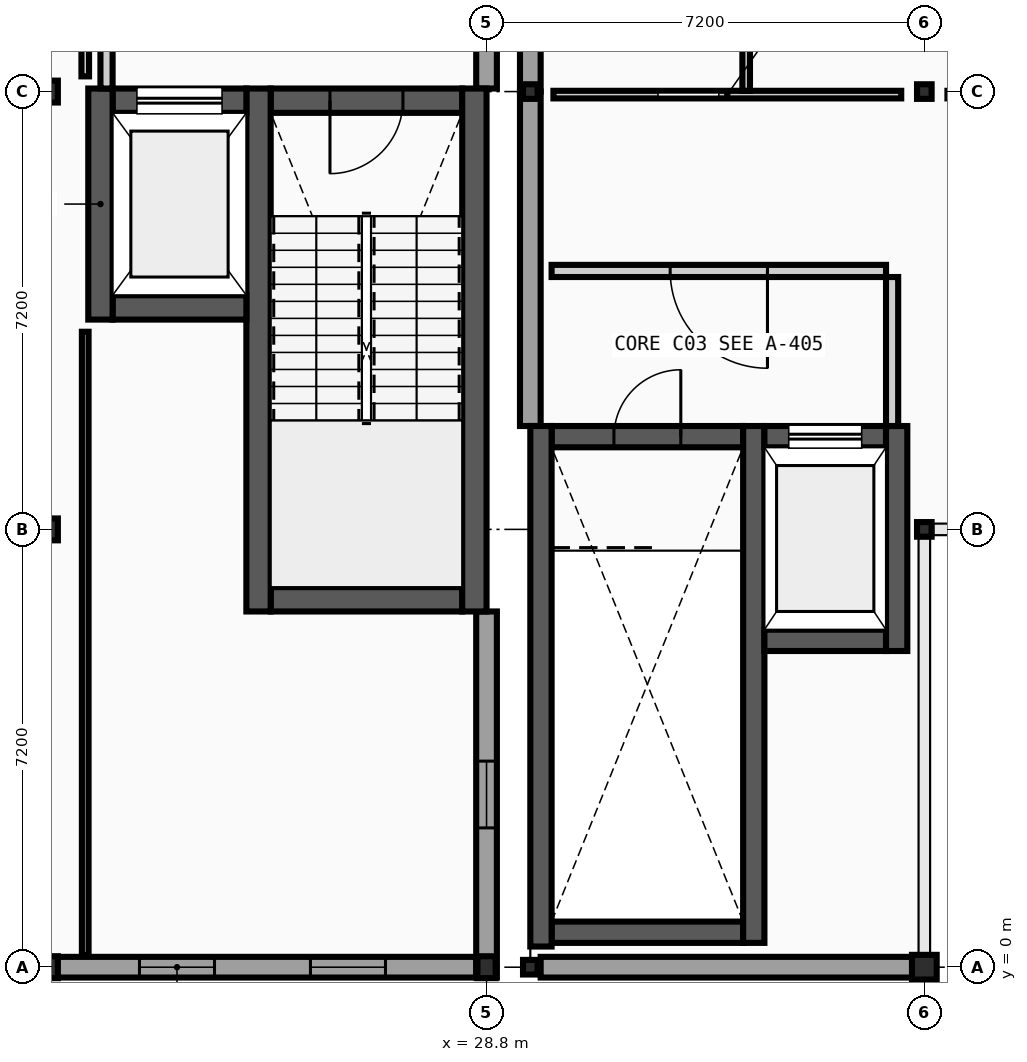
"""IFC4 building model, lengths in metres.
Left out: names, types, materials, properties, quantities, classifications, styles, units other than length and angle.
Written with IfcOpenShell. Run it as: python <this file> out.ifc"""

import sys

from ifc_helpers import new_model, si_unit, direction, frame, frame_2d, origin, origin_2d, place, context, subcontext, project, spatial, rectangle, hollow_circle, i_section, extrude, element, fill, save


model = new_model("IFC4")
c1 = context("Model", 3, precision=1e-05, world=origin(), true_north=direction((0.0, 1.0)))
c2 = subcontext(c1, "Body", "Model", "MODEL_VIEW")
j1 = project(units=[si_unit("LENGTHUNIT", "METRE"), si_unit("PLANEANGLEUNIT", "RADIAN")], contexts=[c1])
p1 = place(None, origin())
s1 = spatial("IfcSite", under=j1, at=p1, CompositionType="ELEMENT")
p2 = place(p1, origin())
s2 = spatial("IfcBuilding", under=s1, at=p2, CompositionType="ELEMENT")
p3 = place(p2, frame((0.0, 0.0, 18.4)))
s3 = spatial("IfcBuildingStorey", under=s2, at=p3, CompositionType="ELEMENT", Elevation=18.4)
for number, where, z_axis, x_axis in (
    (1, (21.6, 0.0, 0.0), (0.0, 0.0, 1.0), (1.0, 0.0, 0.0)),
    (2, (21.6, 7.2, 0.0), (0.0, 0.0, 1.0), (1.0, 0.0, 0.0)),
    (3, (21.6, 14.4, 0.0), (0.0, 0.0, 1.0), (1.0, 0.0, 0.0)),
    (4, (28.8, 0.0, 0.0), (0.0, 0.0, 1.0), (1.0, 0.0, 0.0)),
):
    element("IfcColumn", number, at=place(p3, frame(where, z_axis=z_axis, x_axis=x_axis)), inside=s3, PredefinedType="COLUMN", context=c2, shape_type="SweptSolid", body=[
        extrude(i_section(OverallWidth=0.3, OverallDepth=0.36, WebThickness=0.012, FlangeThickness=0.022, FilletRadius=0.027, at=origin_2d()), origin(), (0.0, 0.0, 1.0), 4.4),
    ])
for number, where, z_axis, x_axis in (
    (5, (29.52, 0.0, 0.0), (0.0, 0.0, 1.0), (1.0, 0.0, 0.0)),
    (6, (29.52, 14.4, 0.0), (0.0, 0.0, 1.0), (1.0, 0.0, 0.0)),
):
    element("IfcColumn", number, at=place(p3, frame(where, z_axis=z_axis, x_axis=x_axis)), inside=s3, PredefinedType="COLUMN", context=c2, shape_type="SweptSolid", body=[
        extrude(i_section(OverallWidth=0.24, OverallDepth=0.24, WebThickness=0.01, FlangeThickness=0.017, FilletRadius=0.021, at=origin_2d()), origin(), (0.0, 0.0, 1.0), 4.4),
    ])
p4 = place(p3, frame((36.0, 0.0, 0.0), z_axis=(0.0, 0.0, 1.0), x_axis=(1.0, 0.0, 0.0)))
e7 = element("IfcColumn", 7, at=p4, inside=s3, PredefinedType="COLUMN", context=c2, shape_type="SweptSolid", body=[
    extrude(hollow_circle(Radius=0.203, WallThickness=0.016, at=origin_2d()), origin(), (0.0, 0.0, 1.0), 4.4),
])
for number, where, z_axis, x_axis in (
    (8, (36.0, 7.2, 0.0), (0.0, 0.0, 1.0), (1.0, 0.0, 0.0)),
    (9, (36.0, 14.4, 0.0), (0.0, 0.0, 1.0), (1.0, 0.0, 0.0)),
):
    element("IfcColumn", number, at=place(p3, frame(where, z_axis=z_axis, x_axis=x_axis)), inside=s3, PredefinedType="COLUMN", context=c2, shape_type="SweptSolid", body=[
        extrude(i_section(OverallWidth=0.24, OverallDepth=0.24, WebThickness=0.01, FlangeThickness=0.017, FilletRadius=0.021, at=origin_2d()), origin(), (0.0, 0.0, 1.0), 4.4),
    ])
p5 = place(p3, frame((21.6, 0.0, 0.0), z_axis=(0.0, 0.0, 1.0), x_axis=(1.0, 0.0, 0.0)))
e10 = element("IfcWall", 10, at=p5, inside=s3, PredefinedType="STANDARD", context=c2, shape_type="SweptSolid", body=[
    extrude(rectangle(XDim=7.03, YDim=0.34, at=frame_2d((3.515, 0.0))), origin(), (0.0, 0.0, 1.0), 3.95),
])
p6 = place(p5, frame((1.492, 0.0, 0.95)))
e11 = element("IfcOpeningElement", 11, at=p6, cuts=e10, PredefinedType="OPENING", context=c2, shape_type="SweptSolid", body=[
    extrude(rectangle(XDim=1.234, YDim=1.368, at=frame_2d((0.617, 0.684))), frame((0.0, 0.18, 0.0), z_axis=(0.0, -1.0, 0.0), x_axis=(1.0, 0.0, 0.0)), (0.0, 0.0, 1.0), 0.36),
])
p7 = place(p5, frame((4.304, 0.0, 0.95)))
e12 = element("IfcOpeningElement", 12, at=p7, cuts=e10, PredefinedType="OPENING", context=c2, shape_type="SweptSolid", body=[
    extrude(rectangle(XDim=1.234, YDim=1.368, at=frame_2d((0.617, 0.684))), frame((0.0, 0.18, 0.0), z_axis=(0.0, -1.0, 0.0), x_axis=(1.0, 0.0, 0.0)), (0.0, 0.0, 1.0), 0.36),
])
p8 = place(p3, frame((28.8, -0.17, 0.0), z_axis=(0.0, 0.0, 1.0), x_axis=(0.0, 1.0, 0.0)))
e13 = element("IfcWall", 13, at=p8, inside=s3, PredefinedType="STANDARD", context=c2, shape_type="SweptSolid", body=[
    extrude(rectangle(XDim=6.02, YDim=0.34, at=frame_2d((3.01, 0.0))), origin(), (0.0, 0.0, 1.0), 4.215),
])
p9 = place(p8, frame((2.461, 0.0, 0.95)))
e14 = element("IfcOpeningElement", 14, at=p9, cuts=e13, PredefinedType="OPENING", context=c2, shape_type="SweptSolid", body=[
    extrude(rectangle(XDim=1.098, YDim=1.404, at=frame_2d((0.549, 0.702))), frame((0.0, 0.18, 0.0), z_axis=(0.0, -1.0, 0.0), x_axis=(1.0, 0.0, 0.0)), (0.0, 0.0, 1.0), 0.36),
])
p10 = place(p3, frame((28.8, 14.45, 0.0), z_axis=(0.0, 0.0, 1.0), x_axis=(0.0, 1.0, 0.0)))
e15 = element("IfcWall", 15, at=p10, inside=s3, PredefinedType="STANDARD", context=c2, shape_type="SweptSolid", body=[
    extrude(rectangle(XDim=7.15, YDim=0.34, at=frame_2d((3.575, 0.0))), origin(), (0.0, 0.0, 1.0), 4.215),
])
p11 = place(p10, frame((1.579, 0.0, 0.95)))
e16 = element("IfcOpeningElement", 16, at=p11, cuts=e15, PredefinedType="OPENING", context=c2, shape_type="SweptSolid", body=[
    extrude(rectangle(XDim=1.132, YDim=1.404, at=frame_2d((0.566, 0.702))), frame((0.0, 0.18, 0.0), z_axis=(0.0, -1.0, 0.0), x_axis=(1.0, 0.0, 0.0)), (0.0, 0.0, 1.0), 0.36),
])
p12 = place(p10, frame((4.439, 0.0, 0.95)))
e17 = element("IfcOpeningElement", 17, at=p12, cuts=e15, PredefinedType="OPENING", context=c2, shape_type="SweptSolid", body=[
    extrude(rectangle(XDim=1.132, YDim=1.404, at=frame_2d((0.566, 0.702))), frame((0.0, 0.18, 0.0), z_axis=(0.0, -1.0, 0.0), x_axis=(1.0, 0.0, 0.0)), (0.0, 0.0, 1.0), 0.36),
])
p13 = place(p3, frame((29.69, 0.0, 0.0), z_axis=(0.0, 0.0, 1.0), x_axis=(1.0, 0.0, 0.0)))
e18 = element("IfcWall", 18, at=p13, inside=s3, PredefinedType="STANDARD", context=c2, shape_type="SweptSolid", body=[
    extrude(rectangle(XDim=6.42, YDim=0.34, at=frame_2d((3.21, 0.0))), origin(), (0.0, 0.0, 1.0), 4.035),
])
p14 = place(p3, frame((29.52, 14.4, 0.0), z_axis=(0.0, 0.0, 1.0), x_axis=(0.0, -1.0, 0.0)))
e19 = element("IfcWall", 19, at=p14, inside=s3, PredefinedType="STANDARD", context=c2, shape_type="SweptSolid", body=[
    extrude(rectangle(XDim=5.5, YDim=0.34, at=frame_2d((2.75, 0.0))), origin(), (0.0, 0.0, 1.0), 4.11),
])
p15 = place(p3, frame((29.52, 21.77, 0.0), z_axis=(0.0, 0.0, 1.0), x_axis=(0.0, -1.0, 0.0)))
e20 = element("IfcWall", 20, at=p15, inside=s3, PredefinedType="STANDARD", context=c2, shape_type="SweptSolid", body=[
    extrude(rectangle(XDim=7.37, YDim=0.34, at=frame_2d((3.685, 0.0))), origin(), (0.0, 0.0, 1.0), 4.11),
])
p16 = place(p15, frame((1.577, 0.0, 0.95)))
e21 = element("IfcOpeningElement", 21, at=p16, cuts=e20, PredefinedType="OPENING", context=c2, shape_type="SweptSolid", body=[
    extrude(rectangle(XDim=1.268, YDim=1.404, at=frame_2d((0.634, 0.702))), frame((0.0, 0.18, 0.0), z_axis=(0.0, -1.0, 0.0), x_axis=(1.0, 0.0, 0.0)), (0.0, 0.0, 1.0), 0.36),
])
p17 = place(p15, frame((4.525, 0.0, 0.95)))
e22 = element("IfcOpeningElement", 22, at=p17, cuts=e20, PredefinedType="OPENING", context=c2, shape_type="SweptSolid", body=[
    extrude(rectangle(XDim=1.268, YDim=1.404, at=frame_2d((0.634, 0.702))), frame((0.0, 0.18, 0.0), z_axis=(0.0, -1.0, 0.0), x_axis=(1.0, 0.0, 0.0)), (0.0, 0.0, 1.0), 0.36),
])
p18 = place(p3, frame((25.25, 6.05, 0.0), z_axis=(0.0, 0.0, 1.0), x_axis=(1.0, 0.0, 0.0)))
e23 = element("IfcWall", 23, at=p18, inside=s3, PredefinedType="SHEAR", context=c2, shape_type="SweptSolid", body=[
    extrude(rectangle(XDim=3.15, YDim=0.4, at=frame_2d((1.575, 0.0))), origin(), (0.0, 0.0, 1.0), 4.215),
])
p19 = place(p3, frame((25.25, 14.25, 0.0), z_axis=(0.0, 0.0, 1.0), x_axis=(1.0, 0.0, 0.0)))
e24 = element("IfcWall", 24, at=p19, inside=s3, PredefinedType="SHEAR", context=c2, shape_type="SweptSolid", body=[
    extrude(rectangle(XDim=3.15, YDim=0.4, at=frame_2d((1.575, 0.0))), origin(), (0.0, 0.0, 1.0), 4.215),
])
p20 = place(p19, frame((0.975, 0.0, 0.0)))
e25 = element("IfcOpeningElement", 25, at=p20, cuts=e24, PredefinedType="OPENING", context=c2, shape_type="SweptSolid", body=[
    extrude(rectangle(XDim=1.2, YDim=2.15, at=frame_2d((0.6, 1.075))), frame((0.0, 0.21, 0.0), z_axis=(0.0, -1.0, 0.0), x_axis=(1.0, 0.0, 0.0)), (0.0, 0.0, 1.0), 0.42),
])
for number, where, z_axis, x_axis in (
    (26, (25.05, 5.85, 0.0), (0.0, 0.0, 1.0), (0.0, 1.0, 0.0)),
    (27, (28.6, 5.85, 0.0), (0.0, 0.0, 1.0), (0.0, 1.0, 0.0)),
):
    element("IfcWall", number, at=place(p3, frame(where, z_axis=z_axis, x_axis=x_axis)), inside=s3, PredefinedType="SHEAR", context=c2, shape_type="SweptSolid", body=[
        extrude(rectangle(XDim=8.6, YDim=0.4, at=frame_2d((4.3, 0.0))), origin(), (0.0, 0.0, 1.0), 4.215),
    ])
p21 = place(p3, frame((22.65, 10.85, 0.0), z_axis=(0.0, 0.0, 1.0), x_axis=(1.0, 0.0, 0.0)))
e28 = element("IfcWall", 28, at=p21, inside=s3, PredefinedType="SHEAR", context=c2, shape_type="SweptSolid", body=[
    extrude(rectangle(XDim=2.2, YDim=0.4, at=frame_2d((1.1, 0.0))), origin(), (0.0, 0.0, 1.0), 4.215),
])
p22 = place(p3, frame((22.65, 14.25, 0.0), z_axis=(0.0, 0.0, 1.0), x_axis=(1.0, 0.0, 0.0)))
e29 = element("IfcWall", 29, at=p22, inside=s3, PredefinedType="SHEAR", context=c2, shape_type="SweptSolid", body=[
    extrude(rectangle(XDim=2.2, YDim=0.4, at=frame_2d((1.1, 0.0))), origin(), (0.0, 0.0, 1.0), 4.215),
])
p23 = place(p22, frame((0.4, 0.0, 0.0)))
e30 = element("IfcOpeningElement", 30, at=p23, cuts=e29, PredefinedType="OPENING", context=c2, shape_type="SweptSolid", body=[
    extrude(rectangle(XDim=1.4, YDim=2.2, at=frame_2d((0.7, 1.1))), frame((0.0, 0.21, 0.0), z_axis=(0.0, -1.0, 0.0), x_axis=(1.0, 0.0, 0.0)), (0.0, 0.0, 1.0), 0.42),
])
p24 = place(p3, frame((22.45, 10.65, 0.0), z_axis=(0.0, 0.0, 1.0), x_axis=(0.0, 1.0, 0.0)))
e31 = element("IfcWall", 31, at=p24, inside=s3, PredefinedType="SHEAR", context=c2, shape_type="SweptSolid", body=[
    extrude(rectangle(XDim=3.8, YDim=0.4, at=frame_2d((1.9, 0.0))), origin(), (0.0, 0.0, 1.0), 4.215),
])
p25 = place(p3, frame((22.55, 14.45, 0.0), z_axis=(0.0, 0.0, 1.0), x_axis=(0.0, 1.0, 0.0)))
e32 = element("IfcWall", 32, at=p25, inside=s3, PredefinedType="PARTITIONING", context=c2, shape_type="SweptSolid", body=[
    extrude(rectangle(XDim=3.2, YDim=0.2, at=frame_2d((1.6, 0.0))), origin(), (0.0, 0.0, 1.0), 4.215),
])
p26 = place(p3, frame((29.87, 0.575, 0.0), z_axis=(0.0, 0.0, 1.0), x_axis=(1.0, 0.0, 0.0)))
e33 = element("IfcWall", 33, at=p26, inside=s3, PredefinedType="SHEAR", context=c2, shape_type="SweptSolid", body=[
    extrude(rectangle(XDim=3.15, YDim=0.35, at=frame_2d((1.575, 0.0))), origin(), (0.0, 0.0, 1.0), 4.18),
])
p27 = place(p3, frame((29.87, 8.725, 0.0), z_axis=(0.0, 0.0, 1.0), x_axis=(1.0, 0.0, 0.0)))
e34 = element("IfcWall", 34, at=p27, inside=s3, PredefinedType="SHEAR", context=c2, shape_type="SweptSolid", body=[
    extrude(rectangle(XDim=3.15, YDim=0.35, at=frame_2d((1.575, 0.0))), origin(), (0.0, 0.0, 1.0), 4.18),
])
p28 = place(p27, frame((1.025, 0.0, 0.0)))
e35 = element("IfcOpeningElement", 35, at=p28, cuts=e34, PredefinedType="OPENING", context=c2, shape_type="SweptSolid", body=[
    extrude(rectangle(XDim=1.1, YDim=2.15, at=frame_2d((0.55, 1.075))), frame((0.0, 0.185, 0.0), z_axis=(0.0, -1.0, 0.0), x_axis=(1.0, 0.0, 0.0)), (0.0, 0.0, 1.0), 0.37),
])
p29 = place(p3, frame((29.695, 0.34, 0.0), z_axis=(0.0, 0.0, 1.0), x_axis=(0.0, 1.0, 0.0)))
e36 = element("IfcWall", 36, at=p29, inside=s3, PredefinedType="SHEAR", context=c2, shape_type="SweptSolid", body=[
    extrude(rectangle(XDim=8.56, YDim=0.35, at=frame_2d((4.28, 0.0))), origin(), (0.0, 0.0, 1.0), 4.18),
])
p30 = place(p3, frame((33.195, 0.4, 0.0), z_axis=(0.0, 0.0, 1.0), x_axis=(0.0, 1.0, 0.0)))
e37 = element("IfcWall", 37, at=p30, inside=s3, PredefinedType="SHEAR", context=c2, shape_type="SweptSolid", body=[
    extrude(rectangle(XDim=8.5, YDim=0.35, at=frame_2d((4.25, 0.0))), origin(), (0.0, 0.0, 1.0), 4.18),
])
p31 = place(p3, frame((33.37, 5.375, 0.0), z_axis=(0.0, 0.0, 1.0), x_axis=(1.0, 0.0, 0.0)))
e38 = element("IfcWall", 38, at=p31, inside=s3, PredefinedType="SHEAR", context=c2, shape_type="SweptSolid", body=[
    extrude(rectangle(XDim=2.0, YDim=0.35, at=frame_2d((1.0, 0.0))), origin(), (0.0, 0.0, 1.0), 4.18),
])
p32 = place(p3, frame((33.37, 8.725, 0.0), z_axis=(0.0, 0.0, 1.0), x_axis=(1.0, 0.0, 0.0)))
e39 = element("IfcWall", 39, at=p32, inside=s3, PredefinedType="SHEAR", context=c2, shape_type="SweptSolid", body=[
    extrude(rectangle(XDim=2.0, YDim=0.35, at=frame_2d((1.0, 0.0))), origin(), (0.0, 0.0, 1.0), 4.18),
])
p33 = place(p32, frame((0.4, 0.0, 0.0)))
e40 = element("IfcOpeningElement", 40, at=p33, cuts=e39, PredefinedType="OPENING", context=c2, shape_type="SweptSolid", body=[
    extrude(rectangle(XDim=1.2, YDim=2.2, at=frame_2d((0.6, 1.1))), frame((0.0, 0.185, 0.0), z_axis=(0.0, -1.0, 0.0), x_axis=(1.0, 0.0, 0.0)), (0.0, 0.0, 1.0), 0.37),
])
p34 = place(p3, frame((35.545, 5.2, 0.0), z_axis=(0.0, 0.0, 1.0), x_axis=(0.0, 1.0, 0.0)))
e41 = element("IfcWall", 41, at=p34, inside=s3, PredefinedType="SHEAR", context=c2, shape_type="SweptSolid", body=[
    extrude(rectangle(XDim=3.7, YDim=0.35, at=frame_2d((1.85, 0.0))), origin(), (0.0, 0.0, 1.0), 4.18),
])
p35 = place(p3, frame((29.87, 11.45, 0.0), z_axis=(0.0, 0.0, 1.0), x_axis=(1.0, 0.0, 0.0)))
e42 = element("IfcWall", 42, at=p35, inside=s3, PredefinedType="PARTITIONING", context=c2, shape_type="SweptSolid", body=[
    extrude(rectangle(XDim=5.5, YDim=0.2, at=frame_2d((2.75, 0.0))), origin(), (0.0, 0.0, 1.0), 4.18),
])
p36 = place(p35, frame((1.95, 0.0, 0.0)))
e43 = element("IfcOpeningElement", 43, at=p36, cuts=e42, PredefinedType="OPENING", context=c2, shape_type="SweptSolid", body=[
    extrude(rectangle(XDim=1.6, YDim=2.2, at=frame_2d((0.8, 1.1))), frame((0.0, 0.11, 0.0), z_axis=(0.0, -1.0, 0.0), x_axis=(1.0, 0.0, 0.0)), (0.0, 0.0, 1.0), 0.22),
])
p37 = place(p3, frame((35.47, 8.9, 0.0), z_axis=(0.0, 0.0, 1.0), x_axis=(0.0, 1.0, 0.0)))
e44 = element("IfcWall", 44, at=p37, inside=s3, PredefinedType="PARTITIONING", context=c2, shape_type="SweptSolid", body=[
    extrude(rectangle(XDim=2.45, YDim=0.2, at=frame_2d((1.225, 0.0))), origin(), (0.0, 0.0, 1.0), 4.18),
])
p38 = place(p3, frame((29.9, 14.35, 0.0), z_axis=(0.0, 0.0, 1.0), x_axis=(1.0, 0.0, 0.0)))
e45 = element("IfcWall", 45, at=p38, inside=s3, PredefinedType="PARTITIONING", context=c2, shape_type="SweptSolid", body=[
    extrude(rectangle(XDim=5.72, YDim=0.125, at=frame_2d((2.86, 0.0))), origin(), (0.0, 0.0, 1.0), 4.035),
])
p39 = place(p38, frame((1.72, 0.0, 0.0)))
e46 = element("IfcOpeningElement", 46, at=p39, cuts=e45, PredefinedType="OPENING", context=c2, shape_type="SweptSolid", body=[
    extrude(rectangle(XDim=1.0, YDim=2.1, at=frame_2d((0.5, 1.05))), frame((0.0, 0.073, 0.0), z_axis=(0.0, -1.0, 0.0), x_axis=(1.0, 0.0, 0.0)), (0.0, 0.0, 1.0), 0.145),
])
p40 = place(p3, frame((22.2, 0.2, 0.0), z_axis=(0.0, 0.0, 1.0), x_axis=(0.0, 1.0, 0.0)))
e47 = element("IfcWall", 47, at=p40, inside=s3, PredefinedType="PARTITIONING", context=c2, shape_type="SweptSolid", body=[
    extrude(rectangle(XDim=10.25, YDim=0.11, at=frame_2d((5.125, 0.0))), origin(), (0.0, 0.0, 1.0), 4.215),
])
p41 = place(p3, frame((22.2, 14.65, 0.0), z_axis=(0.0, 0.0, 1.0), x_axis=(0.0, 1.0, 0.0)))
e48 = element("IfcWall", 48, at=p41, inside=s3, PredefinedType="PARTITIONING", context=c2, shape_type="SweptSolid", body=[
    extrude(rectangle(XDim=3.138, YDim=0.125, at=frame_2d((1.569, 0.0))), origin(), (0.0, 0.0, 1.0), 4.215),
])
p42 = place(p3, frame((33.07, 14.413, 0.0), z_axis=(0.0, 0.0, 1.0), x_axis=(0.0, 1.0, 0.0)))
e49 = element("IfcWall", 49, at=p42, inside=s3, PredefinedType="PARTITIONING", context=c2, shape_type="SweptSolid", body=[
    extrude(rectangle(XDim=6.987, YDim=0.125, at=frame_2d((3.494, 0.0))), origin(), (0.0, 0.0, 1.0), 4.18),
])
p43 = place(p6, origin())
e50 = element("IfcWindow", 50, at=p43, inside=s3, PartitioningType="SINGLE_PANEL", PredefinedType="WINDOW", context=c2, shape_type="SweptSolid", body=[
    extrude(rectangle(XDim=1.234, YDim=1.368, at=frame_2d((0.617, 0.684))), frame((0.0, 0.03, 0.0), z_axis=(0.0, -1.0, 0.0), x_axis=(1.0, 0.0, 0.0)), (0.0, 0.0, 1.0), 0.06),
])
fill(e11, e50)
p44 = place(p7, origin())
e51 = element("IfcWindow", 51, at=p44, inside=s3, PartitioningType="SINGLE_PANEL", PredefinedType="WINDOW", context=c2, shape_type="SweptSolid", body=[
    extrude(rectangle(XDim=1.234, YDim=1.368, at=frame_2d((0.617, 0.684))), frame((0.0, 0.03, 0.0), z_axis=(0.0, -1.0, 0.0), x_axis=(1.0, 0.0, 0.0)), (0.0, 0.0, 1.0), 0.06),
])
fill(e12, e51)
p45 = place(p9, origin())
e52 = element("IfcWindow", 52, at=p45, inside=s3, PartitioningType="SINGLE_PANEL", PredefinedType="WINDOW", context=c2, shape_type="SweptSolid", body=[
    extrude(rectangle(XDim=1.098, YDim=1.404, at=frame_2d((0.549, 0.702))), frame((0.0, 0.03, 0.0), z_axis=(0.0, -1.0, 0.0), x_axis=(1.0, 0.0, 0.0)), (0.0, 0.0, 1.0), 0.06),
])
fill(e14, e52)
p46 = place(p20, frame((1.2, 0.0, 0.0), z_axis=(0.0, 0.0, 1.0), x_axis=(-1.0, 0.0, 0.0)))
e53 = element("IfcDoor", 53, at=p46, inside=s3, OperationType="SINGLE_SWING_LEFT", PredefinedType="DOOR", context=c2, shape_type="SweptSolid", body=[
    extrude(rectangle(XDim=1.2, YDim=2.15, at=frame_2d((0.6, 1.075))), frame((0.0, 0.025, 0.0), z_axis=(0.0, -1.0, 0.0), x_axis=(1.0, 0.0, 0.0)), (0.0, 0.0, 1.0), 0.05),
])
fill(e25, e53)
p47 = place(p23, origin())
e54 = element("IfcDoor", 54, at=p47, inside=s3, OperationType="SLIDING_TO_LEFT", PredefinedType="DOOR", context=c2, shape_type="SweptSolid", body=[
    extrude(rectangle(XDim=1.4, YDim=2.2, at=frame_2d((0.7, 1.1))), frame((0.0, 0.025, 0.0), z_axis=(0.0, -1.0, 0.0), x_axis=(1.0, 0.0, 0.0)), (0.0, 0.0, 1.0), 0.05),
])
fill(e30, e54)
p48 = place(p28, frame((1.1, 0.0, 0.0), z_axis=(0.0, 0.0, 1.0), x_axis=(-1.0, 0.0, 0.0)))
e55 = element("IfcDoor", 55, at=p48, inside=s3, OperationType="SINGLE_SWING_RIGHT", PredefinedType="DOOR", context=c2, shape_type="SweptSolid", body=[
    extrude(rectangle(XDim=1.1, YDim=2.15, at=frame_2d((0.55, 1.075))), frame((0.0, 0.025, 0.0), z_axis=(0.0, -1.0, 0.0), x_axis=(1.0, 0.0, 0.0)), (0.0, 0.0, 1.0), 0.05),
])
fill(e35, e55)
p49 = place(p33, origin())
e56 = element("IfcDoor", 56, at=p49, inside=s3, OperationType="SLIDING_TO_RIGHT", PredefinedType="DOOR", context=c2, shape_type="SweptSolid", body=[
    extrude(rectangle(XDim=1.2, YDim=2.2, at=frame_2d((0.6, 1.1))), frame((0.0, 0.025, 0.0), z_axis=(0.0, -1.0, 0.0), x_axis=(1.0, 0.0, 0.0)), (0.0, 0.0, 1.0), 0.05),
])
fill(e40, e56)
p50 = place(p36, origin())
e57 = element("IfcDoor", 57, at=p50, inside=s3, OperationType="DOUBLE_DOOR_SINGLE_SWING", PredefinedType="DOOR", context=c2, shape_type="SweptSolid", body=[
    extrude(rectangle(XDim=1.6, YDim=2.2, at=frame_2d((0.8, 1.1))), frame((0.0, 0.025, 0.0), z_axis=(0.0, -1.0, 0.0), x_axis=(1.0, 0.0, 0.0)), (0.0, 0.0, 1.0), 0.05),
])
fill(e43, e57)
p51 = place(p39, frame((1.0, 0.0, 0.0), z_axis=(0.0, 0.0, 1.0), x_axis=(-1.0, 0.0, 0.0)))
e58 = element("IfcDoor", 58, at=p51, inside=s3, OperationType="SLIDING_TO_LEFT", PredefinedType="DOOR", context=c2, shape_type="SweptSolid", body=[
    extrude(rectangle(XDim=1.0, YDim=2.1, at=frame_2d((0.5, 1.05))), frame((0.0, 0.025, 0.0), z_axis=(0.0, -1.0, 0.0), x_axis=(1.0, 0.0, 0.0)), (0.0, 0.0, 1.0), 0.05),
])
fill(e46, e58)
save(model, sys.argv[1])
